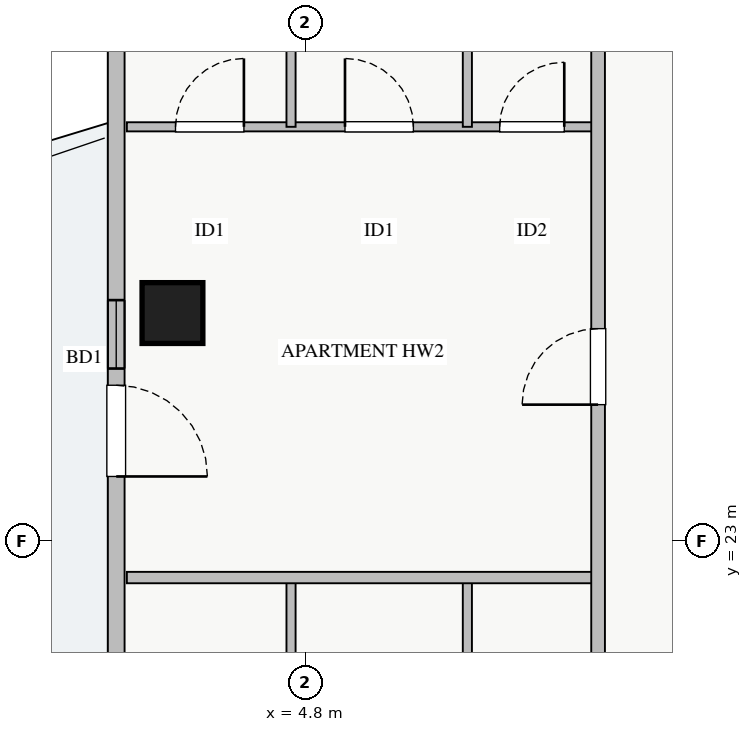
"""IFC4 building model, lengths in metres.
Left out: names, types, materials, properties, quantities, classifications, styles, units other than length and angle.
Written with IfcOpenShell. Run it as: python <this file> out.ifc"""

import sys

from ifc_helpers import new_model, si_unit, direction, frame, frame_2d, origin, origin_2d, place, context, subcontext, project, spatial, rectangle, extrude, source, transform, mapped, element, fill, save


model = new_model("IFC4")
c1 = context("Model", 3, precision=1e-05, world=origin(), true_north=direction((0.0, 1.0)))
c2 = subcontext(c1, "Body", "Model", "MODEL_VIEW")
j1 = project(units=[si_unit("LENGTHUNIT", "METRE"), si_unit("PLANEANGLEUNIT", "RADIAN")], contexts=[c1])
p1 = place(None, origin())
s1 = spatial("IfcSite", under=j1, at=p1, CompositionType="ELEMENT")
p2 = place(p1, origin())
s2 = spatial("IfcBuilding", under=s1, at=p2, CompositionType="ELEMENT")
p3 = place(p2, frame((0.0, 0.0, 193.75)))
s3 = spatial("IfcBuildingStorey", under=s2, at=p3, CompositionType="ELEMENT", Elevation=193.75)
m1 = source(origin(), c2, "Body", "SweptSolid", [
    extrude(rectangle(XDim=0.8, YDim=0.8, at=origin_2d()), origin(), (0.0, 0.0, 1.0), 3.25),
])
p4 = place(p3, frame((3.05, 26.0, 0.0), z_axis=(0.0, 0.0, 1.0), x_axis=(1.0, 0.0, 0.0)))
e1 = element("IfcColumn", 1, at=p4, inside=s3, PredefinedType="COLUMN", context=c2, shape_type="MappedRepresentation", body=[
    mapped(m1, transform((0.0, 0.0, 0.0), x_axis=(1.0, 0.0, 0.0), y_axis=(0.0, 1.0, 0.0), z_axis=(0.0, 0.0, 1.0), scale=1.0)),
])
p5 = place(p3, frame((2.31, 11.65, 0.0), z_axis=(0.0, 0.0, 1.0), x_axis=(0.0, 1.0, 0.0)))
e2 = element("IfcWall", 2, at=p5, inside=s3, PredefinedType="STANDARD", context=c2, shape_type="SweptSolid", body=[
    extrude(rectangle(XDim=22.7, YDim=0.22, at=frame_2d((11.35, 0.0))), origin(), (0.0, 0.0, 1.0), 2.61),
])
p6 = place(p5, frame((12.2, 0.0, 0.0)))
e3 = element("IfcOpeningElement", 3, at=p6, cuts=e2, PredefinedType="OPENING", context=c2, shape_type="SweptSolid", body=[
    extrude(rectangle(XDim=1.2, YDim=2.1, at=frame_2d((0.6, 1.05))), frame((0.0, 0.12, 0.0), z_axis=(0.0, -1.0, 0.0), x_axis=(1.0, 0.0, 0.0)), (0.0, 0.0, 1.0), 0.24),
])
p7 = place(p5, frame((1.638, 0.0, 0.9)))
e4 = element("IfcOpeningElement", 4, at=p7, cuts=e2, PredefinedType="OPENING", context=c2, shape_type="SweptSolid", body=[
    extrude(rectangle(XDim=2.4, YDim=1.48, at=frame_2d((1.2, 0.74))), frame((0.0, 0.12, 0.0), z_axis=(0.0, -1.0, 0.0), x_axis=(1.0, 0.0, 0.0)), (0.0, 0.0, 1.0), 0.24),
])
p8 = place(p5, frame((18.813, 0.0, 0.9)))
e5 = element("IfcOpeningElement", 5, at=p8, cuts=e2, PredefinedType="OPENING", context=c2, shape_type="SweptSolid", body=[
    extrude(rectangle(XDim=2.1, YDim=1.48, at=frame_2d((1.05, 0.74))), frame((0.0, 0.12, 0.0), z_axis=(0.0, -1.0, 0.0), x_axis=(1.0, 0.0, 0.0)), (0.0, 0.0, 1.0), 0.24),
])
p9 = place(p5, frame((5.16, 0.0, 0.9)))
e6 = element("IfcOpeningElement", 6, at=p9, cuts=e2, PredefinedType="OPENING", context=c2, shape_type="SweptSolid", body=[
    extrude(rectangle(XDim=0.9, YDim=1.2, at=frame_2d((0.45, 0.6))), frame((0.0, 0.12, 0.0), z_axis=(0.0, -1.0, 0.0), x_axis=(1.0, 0.0, 0.0)), (0.0, 0.0, 1.0), 0.24),
])
p10 = place(p5, frame((13.62, 0.0, 0.9)))
e7 = element("IfcOpeningElement", 7, at=p10, cuts=e2, PredefinedType="OPENING", context=c2, shape_type="SweptSolid", body=[
    extrude(rectangle(XDim=0.9, YDim=1.2, at=frame_2d((0.45, 0.6))), frame((0.0, 0.12, 0.0), z_axis=(0.0, -1.0, 0.0), x_axis=(1.0, 0.0, 0.0)), (0.0, 0.0, 1.0), 0.24),
])
for number, where, z_axis, x_axis in (
    (8, (4.61, 16.59, 0.0), (0.0, 0.0, 1.0), (0.0, 1.0, 0.0)),
    (9, (6.93, 16.59, 0.0), (0.0, 0.0, 1.0), (0.0, 1.0, 0.0)),
):
    element("IfcWall", number, at=place(p3, frame(where, z_axis=z_axis, x_axis=x_axis)), inside=s3, PredefinedType="PLUMBINGWALL", context=c2, shape_type="SweptSolid", body=[
        extrude(rectangle(XDim=5.93, YDim=0.12, at=frame_2d((2.965, 0.0))), origin(), (0.0, 0.0, 1.0), 3.07),
    ])
p11 = place(p3, frame((2.45, 28.45, 0.0), z_axis=(0.0, 0.0, 1.0), x_axis=(1.0, 0.0, 0.0)))
e10 = element("IfcWall", 10, at=p11, inside=s3, PredefinedType="PLUMBINGWALL", context=c2, shape_type="SweptSolid", body=[
    extrude(rectangle(XDim=6.2, YDim=0.12, at=frame_2d((3.1, 0.0))), origin(), (0.0, 0.0, 1.0), 3.07),
])
p12 = place(p11, frame((0.64, 0.0, 0.0)))
e11 = element("IfcOpeningElement", 11, at=p12, cuts=e10, PredefinedType="OPENING", context=c2, shape_type="SweptSolid", body=[
    extrude(rectangle(XDim=0.9, YDim=2.05, at=frame_2d((0.45, 1.025))), frame((0.0, 0.07, 0.0), z_axis=(0.0, -1.0, 0.0), x_axis=(1.0, 0.0, 0.0)), (0.0, 0.0, 1.0), 0.14),
])
p13 = place(p11, frame((2.87, 0.0, 0.0)))
e12 = element("IfcOpeningElement", 12, at=p13, cuts=e10, PredefinedType="OPENING", context=c2, shape_type="SweptSolid", body=[
    extrude(rectangle(XDim=0.9, YDim=2.05, at=frame_2d((0.45, 1.025))), frame((0.0, 0.07, 0.0), z_axis=(0.0, -1.0, 0.0), x_axis=(1.0, 0.0, 0.0)), (0.0, 0.0, 1.0), 0.14),
])
p14 = place(p11, frame((4.905, 0.0, 0.0)))
e13 = element("IfcOpeningElement", 13, at=p14, cuts=e10, PredefinedType="OPENING", context=c2, shape_type="SweptSolid", body=[
    extrude(rectangle(XDim=0.85, YDim=2.05, at=frame_2d((0.425, 1.025))), frame((0.0, 0.07, 0.0), z_axis=(0.0, -1.0, 0.0), x_axis=(1.0, 0.0, 0.0)), (0.0, 0.0, 1.0), 0.14),
])
for number, where, z_axis, x_axis in (
    (14, (4.61, 28.45, 0.0), (0.0, 0.0, 1.0), (0.0, 1.0, 0.0)),
    (15, (6.93, 28.45, 0.0), (0.0, 0.0, 1.0), (0.0, 1.0, 0.0)),
):
    element("IfcWall", number, at=place(p3, frame(where, z_axis=z_axis, x_axis=x_axis)), inside=s3, PredefinedType="PLUMBINGWALL", context=c2, shape_type="SweptSolid", body=[
        extrude(rectangle(XDim=6.43, YDim=0.12, at=frame_2d((3.215, 0.0))), origin(), (0.0, 0.0, 1.0), 3.07),
    ])
p15 = place(p3, frame((2.45, 22.52, 0.0), z_axis=(0.0, 0.0, 1.0), x_axis=(1.0, 0.0, 0.0)))
e16 = element("IfcWall", 16, at=p15, inside=s3, PredefinedType="PARTITIONING", context=c2, shape_type="SweptSolid", body=[
    extrude(rectangle(XDim=6.2, YDim=0.15, at=frame_2d((3.1, 0.0))), origin(), (0.0, 0.0, 1.0), 3.07),
])
p16 = place(p3, frame((8.65, 6.2, 0.0), z_axis=(0.0, 0.0, 1.0), x_axis=(0.0, 1.0, 0.0)))
e17 = element("IfcWall", 17, at=p16, inside=s3, PredefinedType="PARTITIONING", context=c2, shape_type="SweptSolid", body=[
    extrude(rectangle(XDim=33.6, YDim=0.18, at=frame_2d((16.8, 0.0))), origin(), (0.0, 0.0, 1.0), 3.07),
])
p17 = place(p16, frame((29.605, 0.0, 0.0)))
e18 = element("IfcOpeningElement", 18, at=p17, cuts=e17, PredefinedType="OPENING", context=c2, shape_type="SweptSolid", body=[
    extrude(rectangle(XDim=0.9, YDim=2.05, at=frame_2d((0.45, 1.025))), frame((0.0, 0.1, 0.0), z_axis=(0.0, -1.0, 0.0), x_axis=(1.0, 0.0, 0.0)), (0.0, 0.0, 1.0), 0.2),
])
p18 = place(p16, frame((2.92, 0.0, 0.0)))
e19 = element("IfcOpeningElement", 19, at=p18, cuts=e17, PredefinedType="OPENING", context=c2, shape_type="SweptSolid", body=[
    extrude(rectangle(XDim=0.9, YDim=2.05, at=frame_2d((0.45, 1.025))), frame((0.0, 0.1, 0.0), z_axis=(0.0, -1.0, 0.0), x_axis=(1.0, 0.0, 0.0)), (0.0, 0.0, 1.0), 0.2),
])
p19 = place(p16, frame((6.965, 0.0, 0.0)))
e20 = element("IfcOpeningElement", 20, at=p19, cuts=e17, PredefinedType="OPENING", context=c2, shape_type="SweptSolid", body=[
    extrude(rectangle(XDim=1.0, YDim=2.05, at=frame_2d((0.5, 1.025))), frame((0.0, 0.1, 0.0), z_axis=(0.0, -1.0, 0.0), x_axis=(1.0, 0.0, 0.0)), (0.0, 0.0, 1.0), 0.2),
])
p20 = place(p16, frame((18.595, 0.0, 0.0)))
e21 = element("IfcOpeningElement", 21, at=p20, cuts=e17, PredefinedType="OPENING", context=c2, shape_type="SweptSolid", body=[
    extrude(rectangle(XDim=1.0, YDim=2.05, at=frame_2d((0.5, 1.025))), frame((0.0, 0.1, 0.0), z_axis=(0.0, -1.0, 0.0), x_axis=(1.0, 0.0, 0.0)), (0.0, 0.0, 1.0), 0.2),
])
m2 = source(origin(), c2, "Body", "SweptSolid", [
    extrude(rectangle(XDim=1.2, YDim=2.1, at=frame_2d((0.6, 1.05))), frame((0.0, 0.025, 0.0), z_axis=(0.0, -1.0, 0.0), x_axis=(1.0, 0.0, 0.0)), (0.0, 0.0, 1.0), 0.05),
])
p21 = place(p6, frame((1.2, 0.0, 0.0), z_axis=(0.0, 0.0, 1.0), x_axis=(-1.0, 0.0, 0.0)))
e22 = element("IfcDoor", 22, at=p21, inside=s3, OperationType="SINGLE_SWING_LEFT", PredefinedType="DOOR", context=c2, shape_type="MappedRepresentation", body=[
    mapped(m2, transform((0.0, 0.0, 0.0), x_axis=(1.0, 0.0, 0.0), y_axis=(0.0, 1.0, 0.0), z_axis=(0.0, 0.0, 1.0), scale=1.0)),
])
fill(e3, e22)
m3 = source(origin(), c2, "Body", "SweptSolid", [
    extrude(rectangle(XDim=0.9, YDim=2.05, at=frame_2d((0.45, 1.025))), frame((0.0, 0.025, 0.0), z_axis=(0.0, -1.0, 0.0), x_axis=(1.0, 0.0, 0.0)), (0.0, 0.0, 1.0), 0.05),
])
p22 = place(p12, origin())
e23 = element("IfcDoor", 23, at=p22, inside=s3, OperationType="SINGLE_SWING_RIGHT", PredefinedType="DOOR", context=c2, shape_type="MappedRepresentation", body=[
    mapped(m3, transform((0.0, 0.0, 0.0), x_axis=(1.0, 0.0, 0.0), y_axis=(0.0, 1.0, 0.0), z_axis=(0.0, 0.0, 1.0), scale=1.0)),
])
fill(e11, e23)
p23 = place(p13, origin())
e24 = element("IfcDoor", 24, at=p23, inside=s3, OperationType="SINGLE_SWING_LEFT", PredefinedType="DOOR", context=c2, shape_type="MappedRepresentation", body=[
    mapped(m3, transform((0.0, 0.0, 0.0), x_axis=(1.0, 0.0, 0.0), y_axis=(0.0, 1.0, 0.0), z_axis=(0.0, 0.0, 1.0), scale=1.0)),
])
fill(e12, e24)
m4 = source(origin(), c2, "Body", "SweptSolid", [
    extrude(rectangle(XDim=0.85, YDim=2.05, at=frame_2d((0.425, 1.025))), frame((0.0, 0.025, 0.0), z_axis=(0.0, -1.0, 0.0), x_axis=(1.0, 0.0, 0.0)), (0.0, 0.0, 1.0), 0.05),
])
p24 = place(p14, origin())
e25 = element("IfcDoor", 25, at=p24, inside=s3, OperationType="SINGLE_SWING_RIGHT", PredefinedType="DOOR", context=c2, shape_type="MappedRepresentation", body=[
    mapped(m4, transform((0.0, 0.0, 0.0), x_axis=(1.0, 0.0, 0.0), y_axis=(0.0, 1.0, 0.0), z_axis=(0.0, 0.0, 1.0), scale=1.0)),
])
fill(e13, e25)
m5 = source(origin(), c2, "Body", "SweptSolid", [
    extrude(rectangle(XDim=1.0, YDim=2.05, at=frame_2d((0.5, 1.025))), frame((0.0, 0.025, 0.0), z_axis=(0.0, -1.0, 0.0), x_axis=(1.0, 0.0, 0.0)), (0.0, 0.0, 1.0), 0.05),
])
p25 = place(p20, origin())
e26 = element("IfcDoor", 26, at=p25, inside=s3, OperationType="SINGLE_SWING_LEFT", PredefinedType="DOOR", context=c2, shape_type="MappedRepresentation", body=[
    mapped(m5, transform((0.0, 0.0, 0.0), x_axis=(1.0, 0.0, 0.0), y_axis=(0.0, 1.0, 0.0), z_axis=(0.0, 0.0, 1.0), scale=1.0)),
])
fill(e21, e26)
m6 = source(origin(), c2, "Body", "SweptSolid", [
    extrude(rectangle(XDim=0.9, YDim=1.2, at=frame_2d((0.45, 0.6))), frame((0.0, 0.03, 0.0), z_axis=(0.0, -1.0, 0.0), x_axis=(1.0, 0.0, 0.0)), (0.0, 0.0, 1.0), 0.06),
])
p26 = place(p10, origin())
e27 = element("IfcWindow", 27, at=p26, inside=s3, PartitioningType="SINGLE_PANEL", PredefinedType="WINDOW", context=c2, shape_type="MappedRepresentation", body=[
    mapped(m6, transform((0.0, 0.0, 0.0), x_axis=(1.0, 0.0, 0.0), y_axis=(0.0, 1.0, 0.0), z_axis=(0.0, 0.0, 1.0), scale=1.0)),
])
fill(e7, e27)
save(model, sys.argv[1])
